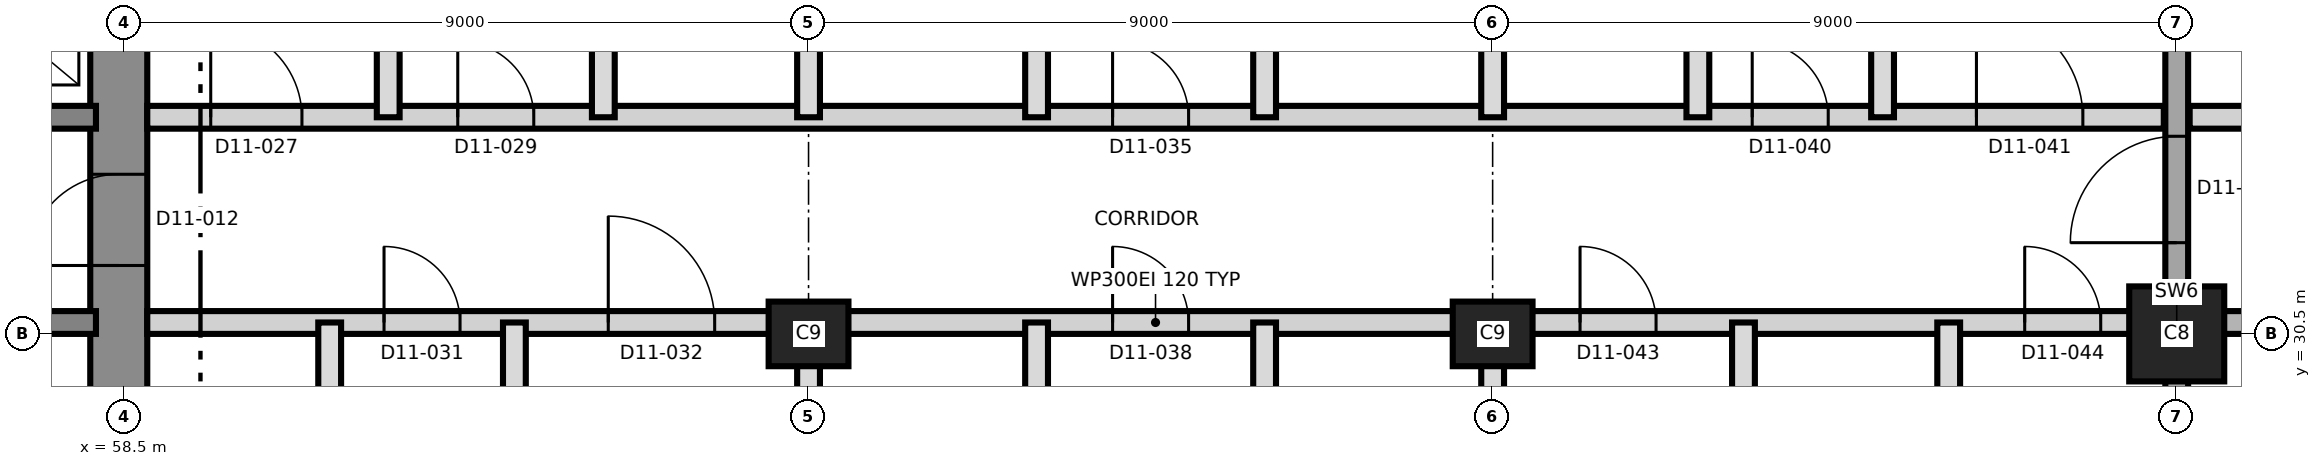
"""IFC4 building model, lengths in metres.
Left out: names, types, materials, properties, quantities, classifications, styles, units other than length and angle.
Written with IfcOpenShell. Run it as: python <this file> out.ifc"""

import sys

from ifc_helpers import new_model, si_unit, direction, frame, frame_2d, origin, origin_2d, place, context, subcontext, project, spatial, rectangle, extrude, element, fill, save


model = new_model("IFC4")
c1 = context("Model", 3, precision=1e-05, world=origin(), true_north=direction((0.0, 1.0)))
c2 = subcontext(c1, "Body", "Model", "MODEL_VIEW")
j1 = project(units=[si_unit("LENGTHUNIT", "METRE"), si_unit("PLANEANGLEUNIT", "RADIAN")], contexts=[c1])
p1 = place(None, origin())
s1 = spatial("IfcSite", under=j1, at=p1, CompositionType="ELEMENT")
p2 = place(p1, origin())
s2 = spatial("IfcBuilding", under=s1, at=p2, CompositionType="ELEMENT")
p3 = place(p2, frame((0.0, 0.0, 131.5)))
s3 = spatial("IfcBuildingStorey", under=s2, at=p3, CompositionType="ELEMENT", Elevation=131.5)
p4 = place(p3, frame((58.425, 21.125, 0.0), z_axis=(0.0, 0.0, 1.0), x_axis=(0.0, 1.0, 0.0)))
e1 = element("IfcWall", 1, at=p4, inside=s3, PredefinedType="SHEAR", context=c2, shape_type="SweptSolid", body=[
    extrude(rectangle(XDim=18.75, YDim=0.75, at=frame_2d((9.375, 0.0))), origin(), (0.0, 0.0, 1.0), 3.7),
])
p5 = place(p4, frame((10.275, 0.0, 0.0)))
e2 = element("IfcOpeningElement", 2, at=p5, cuts=e1, PredefinedType="OPENING", context=c2, shape_type="SweptSolid", body=[
    extrude(rectangle(XDim=1.2, YDim=2.1, at=frame_2d((0.6, 1.05))), frame((0.0, 0.385, 0.0), z_axis=(0.0, -1.0, 0.0), x_axis=(1.0, 0.0, 0.0)), (0.0, 0.0, 1.0), 0.77),
])
p6 = place(p3, frame((31.875, 30.65, 0.0), z_axis=(0.0, 0.0, 1.0), x_axis=(1.0, 0.0, 0.0)))
e3 = element("IfcWall", 3, at=p6, inside=s3, PredefinedType="SHEAR", context=c2, shape_type="SweptSolid", body=[
    extrude(rectangle(XDim=26.25, YDim=0.3, at=frame_2d((13.125, 0.0))), origin(), (0.0, 0.0, 1.0), 3.7),
])
p7 = place(p6, frame((24.625, 0.0, 0.0)))
e4 = element("IfcOpeningElement", 4, at=p7, cuts=e3, PredefinedType="OPENING", context=c2, shape_type="SweptSolid", body=[
    extrude(rectangle(XDim=1.0, YDim=2.1, at=frame_2d((0.5, 1.05))), frame((0.0, 0.16, 0.0), z_axis=(0.0, -1.0, 0.0), x_axis=(1.0, 0.0, 0.0)), (0.0, 0.0, 1.0), 0.32),
])
p8 = place(p6, frame((11.425, 0.0, 0.0)))
e5 = element("IfcOpeningElement", 5, at=p8, cuts=e3, PredefinedType="OPENING", context=c2, shape_type="SweptSolid", body=[
    extrude(rectangle(XDim=1.0, YDim=2.1, at=frame_2d((0.5, 1.05))), frame((0.0, 0.16, 0.0), z_axis=(0.0, -1.0, 0.0), x_axis=(1.0, 0.0, 0.0)), (0.0, 0.0, 1.0), 0.32),
])
p9 = place(p3, frame((31.875, 33.35, 0.0), z_axis=(0.0, 0.0, 1.0), x_axis=(1.0, 0.0, 0.0)))
e6 = element("IfcWall", 6, at=p9, inside=s3, PredefinedType="SHEAR", context=c2, shape_type="SweptSolid", body=[
    extrude(rectangle(XDim=26.25, YDim=0.3, at=frame_2d((13.125, 0.0))), origin(), (0.0, 0.0, 1.0), 3.7),
])
p10 = place(p9, frame((13.2, 0.0, 0.0)))
e7 = element("IfcOpeningElement", 7, at=p10, cuts=e6, PredefinedType="OPENING", context=c2, shape_type="SweptSolid", body=[
    extrude(rectangle(XDim=1.4, YDim=2.1, at=frame_2d((0.7, 1.05))), frame((0.0, 0.16, 0.0), z_axis=(0.0, -1.0, 0.0), x_axis=(1.0, 0.0, 0.0)), (0.0, 0.0, 1.0), 0.32),
])
p11 = place(p9, frame((5.25, 0.0, 0.0)))
e8 = element("IfcOpeningElement", 8, at=p11, cuts=e6, PredefinedType="OPENING", context=c2, shape_type="SweptSolid", body=[
    extrude(rectangle(XDim=1.2, YDim=2.1, at=frame_2d((0.6, 1.05))), frame((0.0, 0.16, 0.0), z_axis=(0.0, -1.0, 0.0), x_axis=(1.0, 0.0, 0.0)), (0.0, 0.0, 1.0), 0.32),
])
p12 = place(p9, frame((19.8, 0.0, 0.0)))
e9 = element("IfcOpeningElement", 9, at=p12, cuts=e6, PredefinedType="OPENING", context=c2, shape_type="SweptSolid", body=[
    extrude(rectangle(XDim=1.2, YDim=2.1, at=frame_2d((0.6, 1.05))), frame((0.0, 0.16, 0.0), z_axis=(0.0, -1.0, 0.0), x_axis=(1.0, 0.0, 0.0)), (0.0, 0.0, 1.0), 0.32),
])
for number, where, z_axis, x_axis in (
    (10, (67.5, 30.5, 0.0), (0.0, 0.0, 1.0), (1.0, 0.0, 0.0)),
    (11, (76.5, 30.5, 0.0), (0.0, 0.0, 1.0), (1.0, 0.0, 0.0)),
):
    element("IfcColumn", number, at=place(p3, frame(where, z_axis=z_axis, x_axis=x_axis)), inside=s3, PredefinedType="COLUMN", context=c2, shape_type="SweptSolid", body=[
        extrude(rectangle(XDim=1.05, YDim=0.85, at=origin_2d()), origin(), (0.0, 0.0, 1.0), 3.7),
    ])
p13 = place(p3, frame((85.5, 30.5, 0.0), z_axis=(0.0, 0.0, 1.0), x_axis=(1.0, 0.0, 0.0)))
e12 = element("IfcColumn", 12, at=p13, inside=s3, PredefinedType="COLUMN", context=c2, shape_type="SweptSolid", body=[
    extrude(rectangle(XDim=1.25, YDim=1.25, at=origin_2d()), origin(), (0.0, 0.0, 1.0), 3.7),
])
p14 = place(p3, frame((85.5, 20.135, 0.0), z_axis=(0.0, 0.0, 1.0), x_axis=(0.0, 1.0, 0.0)))
e13 = element("IfcWall", 13, at=p14, inside=s3, PredefinedType="SHEAR", context=c2, shape_type="SweptSolid", body=[
    extrude(rectangle(XDim=20.73, YDim=0.3, at=frame_2d((10.365, 0.0))), origin(), (0.0, 0.0, 1.0), 3.7),
])
p15 = place(p14, frame((11.565, 0.0, 0.0)))
e14 = element("IfcOpeningElement", 14, at=p15, cuts=e13, PredefinedType="OPENING", context=c2, shape_type="SweptSolid", body=[
    extrude(rectangle(XDim=1.4, YDim=2.1, at=frame_2d((0.7, 1.05))), frame((0.0, 0.16, 0.0), z_axis=(0.0, -1.0, 0.0), x_axis=(1.0, 0.0, 0.0)), (0.0, 0.0, 1.0), 0.32),
])
p16 = place(p3, frame((58.8, 30.65, 0.0), z_axis=(0.0, 0.0, 1.0), x_axis=(1.0, 0.0, 0.0)))
e15 = element("IfcWall", 15, at=p16, inside=s3, PredefinedType="PARTITIONING", context=c2, shape_type="SweptSolid", body=[
    extrude(rectangle(XDim=26.53, YDim=0.3, at=frame_2d((13.265, 0.0))), origin(), (0.0, 0.0, 1.0), 3.4),
])
p17 = place(p16, frame((3.115, 0.0, 0.0)))
e16 = element("IfcOpeningElement", 16, at=p17, cuts=e15, PredefinedType="OPENING", context=c2, shape_type="SweptSolid", body=[
    extrude(rectangle(XDim=1.0, YDim=2.1, at=frame_2d((0.5, 1.05))), frame((0.0, 0.16, 0.0), z_axis=(0.0, -1.0, 0.0), x_axis=(1.0, 0.0, 0.0)), (0.0, 0.0, 1.0), 0.32),
])
p18 = place(p16, frame((6.065, 0.0, 0.0)))
e17 = element("IfcOpeningElement", 17, at=p18, cuts=e15, PredefinedType="OPENING", context=c2, shape_type="SweptSolid", body=[
    extrude(rectangle(XDim=1.4, YDim=2.1, at=frame_2d((0.7, 1.05))), frame((0.0, 0.16, 0.0), z_axis=(0.0, -1.0, 0.0), x_axis=(1.0, 0.0, 0.0)), (0.0, 0.0, 1.0), 0.32),
])
p19 = place(p16, frame((12.7, 0.0, 0.0)))
e18 = element("IfcOpeningElement", 18, at=p19, cuts=e15, PredefinedType="OPENING", context=c2, shape_type="SweptSolid", body=[
    extrude(rectangle(XDim=1.0, YDim=2.4, at=frame_2d((0.5, 1.2))), frame((0.0, 0.16, 0.0), z_axis=(0.0, -1.0, 0.0), x_axis=(1.0, 0.0, 0.0)), (0.0, 0.0, 1.0), 0.32),
])
p20 = place(p16, frame((18.85, 0.0, 0.0)))
e19 = element("IfcOpeningElement", 19, at=p20, cuts=e15, PredefinedType="OPENING", context=c2, shape_type="SweptSolid", body=[
    extrude(rectangle(XDim=1.0, YDim=2.1, at=frame_2d((0.5, 1.05))), frame((0.0, 0.16, 0.0), z_axis=(0.0, -1.0, 0.0), x_axis=(1.0, 0.0, 0.0)), (0.0, 0.0, 1.0), 0.32),
])
p21 = place(p16, frame((24.7, 0.0, 0.0)))
e20 = element("IfcOpeningElement", 20, at=p21, cuts=e15, PredefinedType="OPENING", context=c2, shape_type="SweptSolid", body=[
    extrude(rectangle(XDim=1.0, YDim=2.1, at=frame_2d((0.5, 1.05))), frame((0.0, 0.16, 0.0), z_axis=(0.0, -1.0, 0.0), x_axis=(1.0, 0.0, 0.0)), (0.0, 0.0, 1.0), 0.32),
])
p22 = place(p3, frame((85.67, 30.65, 0.0), z_axis=(0.0, 0.0, 1.0), x_axis=(1.0, 0.0, 0.0)))
e21 = element("IfcWall", 21, at=p22, inside=s3, PredefinedType="SHEAR", context=c2, shape_type="SweptSolid", body=[
    extrude(rectangle(XDim=9.58, YDim=0.3, at=frame_2d((4.79, 0.0))), origin(), (0.0, 0.0, 1.0), 3.4),
])
p23 = place(p22, frame((2.08, 0.0, 0.0)))
e22 = element("IfcOpeningElement", 22, at=p23, cuts=e21, PredefinedType="OPENING", context=c2, shape_type="SweptSolid", body=[
    extrude(rectangle(XDim=1.2, YDim=2.1, at=frame_2d((0.6, 1.05))), frame((0.0, 0.16, 0.0), z_axis=(0.0, -1.0, 0.0), x_axis=(1.0, 0.0, 0.0)), (0.0, 0.0, 1.0), 0.32),
])
p24 = place(p22, frame((5.63, 0.0, 0.0)))
e23 = element("IfcOpeningElement", 23, at=p24, cuts=e21, PredefinedType="OPENING", context=c2, shape_type="SweptSolid", body=[
    extrude(rectangle(XDim=1.0, YDim=2.1, at=frame_2d((0.5, 1.05))), frame((0.0, 0.16, 0.0), z_axis=(0.0, -1.0, 0.0), x_axis=(1.0, 0.0, 0.0)), (0.0, 0.0, 1.0), 0.32),
])
p25 = place(p3, frame((58.8, 33.35, 0.0), z_axis=(0.0, 0.0, 1.0), x_axis=(1.0, 0.0, 0.0)))
e24 = element("IfcWall", 24, at=p25, inside=s3, PredefinedType="PARTITIONING", context=c2, shape_type="SweptSolid", body=[
    extrude(rectangle(XDim=26.53, YDim=0.3, at=frame_2d((13.265, 0.0))), origin(), (0.0, 0.0, 1.0), 3.4),
])
p26 = place(p25, frame((0.835, 0.0, 0.0)))
e25 = element("IfcOpeningElement", 25, at=p26, cuts=e24, PredefinedType="OPENING", context=c2, shape_type="SweptSolid", body=[
    extrude(rectangle(XDim=1.2, YDim=2.1, at=frame_2d((0.6, 1.05))), frame((0.0, 0.16, 0.0), z_axis=(0.0, -1.0, 0.0), x_axis=(1.0, 0.0, 0.0)), (0.0, 0.0, 1.0), 0.32),
])
p27 = place(p25, frame((4.085, 0.0, 0.0)))
e26 = element("IfcOpeningElement", 26, at=p27, cuts=e24, PredefinedType="OPENING", context=c2, shape_type="SweptSolid", body=[
    extrude(rectangle(XDim=1.0, YDim=2.1, at=frame_2d((0.5, 1.05))), frame((0.0, 0.16, 0.0), z_axis=(0.0, -1.0, 0.0), x_axis=(1.0, 0.0, 0.0)), (0.0, 0.0, 1.0), 0.32),
])
p28 = place(p25, frame((12.7, 0.0, 0.0)))
e27 = element("IfcOpeningElement", 27, at=p28, cuts=e24, PredefinedType="OPENING", context=c2, shape_type="SweptSolid", body=[
    extrude(rectangle(XDim=1.0, YDim=2.4, at=frame_2d((0.5, 1.2))), frame((0.0, 0.16, 0.0), z_axis=(0.0, -1.0, 0.0), x_axis=(1.0, 0.0, 0.0)), (0.0, 0.0, 1.0), 0.32),
])
p29 = place(p25, frame((21.115, 0.0, 0.0)))
e28 = element("IfcOpeningElement", 28, at=p29, cuts=e24, PredefinedType="OPENING", context=c2, shape_type="SweptSolid", body=[
    extrude(rectangle(XDim=1.0, YDim=2.1, at=frame_2d((0.5, 1.05))), frame((0.0, 0.16, 0.0), z_axis=(0.0, -1.0, 0.0), x_axis=(1.0, 0.0, 0.0)), (0.0, 0.0, 1.0), 0.32),
])
p30 = place(p25, frame((24.065, 0.0, 0.0)))
e29 = element("IfcOpeningElement", 29, at=p30, cuts=e24, PredefinedType="OPENING", context=c2, shape_type="SweptSolid", body=[
    extrude(rectangle(XDim=1.4, YDim=2.1, at=frame_2d((0.7, 1.05))), frame((0.0, 0.16, 0.0), z_axis=(0.0, -1.0, 0.0), x_axis=(1.0, 0.0, 0.0)), (0.0, 0.0, 1.0), 0.32),
])
p31 = place(p3, frame((85.67, 33.35, 0.0), z_axis=(0.0, 0.0, 1.0), x_axis=(1.0, 0.0, 0.0)))
e30 = element("IfcWall", 30, at=p31, inside=s3, PredefinedType="PARTITIONING", context=c2, shape_type="SweptSolid", body=[
    extrude(rectangle(XDim=9.58, YDim=0.3, at=frame_2d((4.79, 0.0))), origin(), (0.0, 0.0, 1.0), 3.4),
])
p32 = place(p31, frame((1.83, 0.0, 0.0)))
e31 = element("IfcOpeningElement", 31, at=p32, cuts=e30, PredefinedType="OPENING", context=c2, shape_type="SweptSolid", body=[
    extrude(rectangle(XDim=1.0, YDim=2.1, at=frame_2d((0.5, 1.05))), frame((0.0, 0.16, 0.0), z_axis=(0.0, -1.0, 0.0), x_axis=(1.0, 0.0, 0.0)), (0.0, 0.0, 1.0), 0.32),
])
p33 = place(p31, frame((5.63, 0.0, 0.0)))
e32 = element("IfcOpeningElement", 32, at=p33, cuts=e30, PredefinedType="OPENING", context=c2, shape_type="SweptSolid", body=[
    extrude(rectangle(XDim=1.0, YDim=2.1, at=frame_2d((0.5, 1.05))), frame((0.0, 0.16, 0.0), z_axis=(0.0, -1.0, 0.0), x_axis=(1.0, 0.0, 0.0)), (0.0, 0.0, 1.0), 0.32),
])
p34 = place(p3, frame((61.2, 27.45, 0.0), z_axis=(0.0, 0.0, 1.0), x_axis=(0.0, 1.0, 0.0)))
e33 = element("IfcWall", 33, at=p34, inside=s3, PredefinedType="PARTITIONING", context=c2, shape_type="SweptSolid", body=[
    extrude(rectangle(XDim=3.2, YDim=0.3, at=frame_2d((1.6, 0.0))), origin(), (0.0, 0.0, 1.0), 3.4),
])
p35 = place(p3, frame((61.97, 33.35, 0.0), z_axis=(0.0, 0.0, 1.0), x_axis=(0.0, 1.0, 0.0)))
e34 = element("IfcWall", 34, at=p35, inside=s3, PredefinedType="PARTITIONING", context=c2, shape_type="SweptSolid", body=[
    extrude(rectangle(XDim=7.695, YDim=0.3, at=frame_2d((3.847, 0.0))), origin(), (0.0, 0.0, 1.0), 3.35),
])
p36 = place(p3, frame((63.63, 20.135, 0.0), z_axis=(0.0, 0.0, 1.0), x_axis=(0.0, 1.0, 0.0)))
e35 = element("IfcWall", 35, at=p36, inside=s3, PredefinedType="PARTITIONING", context=c2, shape_type="SweptSolid", body=[
    extrude(rectangle(XDim=10.515, YDim=0.3, at=frame_2d((5.257, 0.0))), origin(), (0.0, 0.0, 1.0), 3.35),
])
p37 = place(p3, frame((64.8, 33.35, 0.0), z_axis=(0.0, 0.0, 1.0), x_axis=(0.0, 1.0, 0.0)))
e36 = element("IfcWall", 36, at=p37, inside=s3, PredefinedType="PARTITIONING", context=c2, shape_type="SweptSolid", body=[
    extrude(rectangle(XDim=3.2, YDim=0.3, at=frame_2d((1.6, 0.0))), origin(), (0.0, 0.0, 1.0), 3.4),
])
p38 = place(p3, frame((67.5, 20.135, 0.0), z_axis=(0.0, 0.0, 1.0), x_axis=(0.0, 1.0, 0.0)))
e37 = element("IfcWall", 37, at=p38, inside=s3, PredefinedType="PARTITIONING", context=c2, shape_type="SweptSolid", body=[
    extrude(rectangle(XDim=10.515, YDim=0.3, at=frame_2d((5.257, 0.0))), origin(), (0.0, 0.0, 1.0), 3.35),
])
p39 = place(p3, frame((67.5, 33.35, 0.0), z_axis=(0.0, 0.0, 1.0), x_axis=(0.0, 1.0, 0.0)))
e38 = element("IfcWall", 38, at=p39, inside=s3, PredefinedType="PARTITIONING", context=c2, shape_type="SweptSolid", body=[
    extrude(rectangle(XDim=7.695, YDim=0.3, at=frame_2d((3.847, 0.0))), origin(), (0.0, 0.0, 1.0), 3.35),
])
for number, where, z_axis, x_axis in (
    (39, (70.5, 27.35, 0.0), (0.0, 0.0, 1.0), (0.0, 1.0, 0.0)),
    (40, (70.5, 33.35, 0.0), (0.0, 0.0, 1.0), (0.0, 1.0, 0.0)),
    (41, (73.5, 27.35, 0.0), (0.0, 0.0, 1.0), (0.0, 1.0, 0.0)),
    (42, (73.5, 33.35, 0.0), (0.0, 0.0, 1.0), (0.0, 1.0, 0.0)),
):
    element("IfcWall", number, at=place(p3, frame(where, z_axis=z_axis, x_axis=x_axis)), inside=s3, PredefinedType="PARTITIONING", context=c2, shape_type="SweptSolid", body=[
        extrude(rectangle(XDim=3.3, YDim=0.3, at=frame_2d((1.65, 0.0))), origin(), (0.0, 0.0, 1.0), 3.4),
    ])
p40 = place(p3, frame((76.5, 20.135, 0.0), z_axis=(0.0, 0.0, 1.0), x_axis=(0.0, 1.0, 0.0)))
e43 = element("IfcWall", 43, at=p40, inside=s3, PredefinedType="PARTITIONING", context=c2, shape_type="SweptSolid", body=[
    extrude(rectangle(XDim=10.515, YDim=0.3, at=frame_2d((5.257, 0.0))), origin(), (0.0, 0.0, 1.0), 3.35),
])
p41 = place(p3, frame((76.5, 33.35, 0.0), z_axis=(0.0, 0.0, 1.0), x_axis=(0.0, 1.0, 0.0)))
e44 = element("IfcWall", 44, at=p41, inside=s3, PredefinedType="PARTITIONING", context=c2, shape_type="SweptSolid", body=[
    extrude(rectangle(XDim=7.695, YDim=0.3, at=frame_2d((3.847, 0.0))), origin(), (0.0, 0.0, 1.0), 3.35),
])
for number, where, z_axis, x_axis in (
    (45, (79.2, 33.35, 0.0), (0.0, 0.0, 1.0), (0.0, 1.0, 0.0)),
    (46, (79.8, 27.45, 0.0), (0.0, 0.0, 1.0), (0.0, 1.0, 0.0)),
):
    element("IfcWall", number, at=place(p3, frame(where, z_axis=z_axis, x_axis=x_axis)), inside=s3, PredefinedType="PARTITIONING", context=c2, shape_type="SweptSolid", body=[
        extrude(rectangle(XDim=3.2, YDim=0.3, at=frame_2d((1.6, 0.0))), origin(), (0.0, 0.0, 1.0), 3.4),
    ])
p42 = place(p3, frame((81.63, 33.35, 0.0), z_axis=(0.0, 0.0, 1.0), x_axis=(0.0, 1.0, 0.0)))
e47 = element("IfcWall", 47, at=p42, inside=s3, PredefinedType="PARTITIONING", context=c2, shape_type="SweptSolid", body=[
    extrude(rectangle(XDim=7.695, YDim=0.3, at=frame_2d((3.847, 0.0))), origin(), (0.0, 0.0, 1.0), 3.35),
])
p43 = place(p3, frame((82.5, 20.135, 0.0), z_axis=(0.0, 0.0, 1.0), x_axis=(0.0, 1.0, 0.0)))
e48 = element("IfcWall", 48, at=p43, inside=s3, PredefinedType="PARTITIONING", context=c2, shape_type="SweptSolid", body=[
    extrude(rectangle(XDim=10.515, YDim=0.3, at=frame_2d((5.257, 0.0))), origin(), (0.0, 0.0, 1.0), 3.35),
])
p44 = place(p5, origin())
e49 = element("IfcDoor", 49, at=p44, inside=s3, OperationType="SINGLE_SWING_LEFT", PredefinedType="DOOR", context=c2, shape_type="SweptSolid", body=[
    extrude(rectangle(XDim=1.2, YDim=2.1, at=frame_2d((0.6, 1.05))), frame((0.0, 0.025, 0.0), z_axis=(0.0, -1.0, 0.0), x_axis=(1.0, 0.0, 0.0)), (0.0, 0.0, 1.0), 0.05),
])
fill(e2, e49)
p45 = place(p26, origin())
e50 = element("IfcDoor", 50, at=p45, inside=s3, OperationType="SINGLE_SWING_LEFT", PredefinedType="DOOR", context=c2, shape_type="SweptSolid", body=[
    extrude(rectangle(XDim=1.2, YDim=2.1, at=frame_2d((0.6, 1.05))), frame((0.0, 0.025, 0.0), z_axis=(0.0, -1.0, 0.0), x_axis=(1.0, 0.0, 0.0)), (0.0, 0.0, 1.0), 0.05),
])
fill(e25, e50)
p46 = place(p27, origin())
e51 = element("IfcDoor", 51, at=p46, inside=s3, OperationType="SINGLE_SWING_LEFT", PredefinedType="DOOR", context=c2, shape_type="SweptSolid", body=[
    extrude(rectangle(XDim=1.0, YDim=2.1, at=frame_2d((0.5, 1.05))), frame((0.0, 0.025, 0.0), z_axis=(0.0, -1.0, 0.0), x_axis=(1.0, 0.0, 0.0)), (0.0, 0.0, 1.0), 0.05),
])
fill(e26, e51)
p47 = place(p17, origin())
e52 = element("IfcDoor", 52, at=p47, inside=s3, OperationType="SINGLE_SWING_LEFT", PredefinedType="DOOR", context=c2, shape_type="SweptSolid", body=[
    extrude(rectangle(XDim=1.0, YDim=2.1, at=frame_2d((0.5, 1.05))), frame((0.0, 0.025, 0.0), z_axis=(0.0, -1.0, 0.0), x_axis=(1.0, 0.0, 0.0)), (0.0, 0.0, 1.0), 0.05),
])
fill(e16, e52)
p48 = place(p18, origin())
e53 = element("IfcDoor", 53, at=p48, inside=s3, OperationType="SINGLE_SWING_RIGHT", PredefinedType="DOOR", context=c2, shape_type="SweptSolid", body=[
    extrude(rectangle(XDim=1.4, YDim=2.1, at=frame_2d((0.7, 1.05))), frame((0.0, 0.025, 0.0), z_axis=(0.0, -1.0, 0.0), x_axis=(1.0, 0.0, 0.0)), (0.0, 0.0, 1.0), 0.05),
])
fill(e17, e53)
p49 = place(p28, origin())
e54 = element("IfcDoor", 54, at=p49, inside=s3, OperationType="SINGLE_SWING_LEFT", PredefinedType="DOOR", context=c2, shape_type="SweptSolid", body=[
    extrude(rectangle(XDim=1.0, YDim=2.4, at=frame_2d((0.5, 1.2))), frame((0.0, 0.025, 0.0), z_axis=(0.0, -1.0, 0.0), x_axis=(1.0, 0.0, 0.0)), (0.0, 0.0, 1.0), 0.05),
])
fill(e27, e54)
p50 = place(p19, origin())
e55 = element("IfcDoor", 55, at=p50, inside=s3, OperationType="SINGLE_SWING_LEFT", PredefinedType="DOOR", context=c2, shape_type="SweptSolid", body=[
    extrude(rectangle(XDim=1.0, YDim=2.4, at=frame_2d((0.5, 1.2))), frame((0.0, 0.025, 0.0), z_axis=(0.0, -1.0, 0.0), x_axis=(1.0, 0.0, 0.0)), (0.0, 0.0, 1.0), 0.05),
])
fill(e18, e55)
p51 = place(p29, origin())
e56 = element("IfcDoor", 56, at=p51, inside=s3, OperationType="SINGLE_SWING_LEFT", PredefinedType="DOOR", context=c2, shape_type="SweptSolid", body=[
    extrude(rectangle(XDim=1.0, YDim=2.1, at=frame_2d((0.5, 1.05))), frame((0.0, 0.025, 0.0), z_axis=(0.0, -1.0, 0.0), x_axis=(1.0, 0.0, 0.0)), (0.0, 0.0, 1.0), 0.05),
])
fill(e28, e56)
p52 = place(p30, origin())
e57 = element("IfcDoor", 57, at=p52, inside=s3, OperationType="SINGLE_SWING_RIGHT", PredefinedType="DOOR", context=c2, shape_type="SweptSolid", body=[
    extrude(rectangle(XDim=1.4, YDim=2.1, at=frame_2d((0.7, 1.05))), frame((0.0, 0.025, 0.0), z_axis=(0.0, -1.0, 0.0), x_axis=(1.0, 0.0, 0.0)), (0.0, 0.0, 1.0), 0.05),
])
fill(e29, e57)
p53 = place(p20, origin())
e58 = element("IfcDoor", 58, at=p53, inside=s3, OperationType="SINGLE_SWING_LEFT", PredefinedType="DOOR", context=c2, shape_type="SweptSolid", body=[
    extrude(rectangle(XDim=1.0, YDim=2.1, at=frame_2d((0.5, 1.05))), frame((0.0, 0.025, 0.0), z_axis=(0.0, -1.0, 0.0), x_axis=(1.0, 0.0, 0.0)), (0.0, 0.0, 1.0), 0.05),
])
fill(e19, e58)
p54 = place(p21, origin())
e59 = element("IfcDoor", 59, at=p54, inside=s3, OperationType="SINGLE_SWING_RIGHT", PredefinedType="DOOR", context=c2, shape_type="SweptSolid", body=[
    extrude(rectangle(XDim=1.0, YDim=2.1, at=frame_2d((0.5, 1.05))), frame((0.0, 0.025, 0.0), z_axis=(0.0, -1.0, 0.0), x_axis=(1.0, 0.0, 0.0)), (0.0, 0.0, 1.0), 0.05),
])
fill(e20, e59)
p55 = place(p15, origin())
e60 = element("IfcDoor", 60, at=p55, inside=s3, OperationType="SINGLE_SWING_RIGHT", PredefinedType="DOOR", context=c2, shape_type="SweptSolid", body=[
    extrude(rectangle(XDim=1.4, YDim=2.1, at=frame_2d((0.7, 1.05))), frame((0.0, 0.025, 0.0), z_axis=(0.0, -1.0, 0.0), x_axis=(1.0, 0.0, 0.0)), (0.0, 0.0, 1.0), 0.05),
])
fill(e14, e60)
save(model, sys.argv[1])
